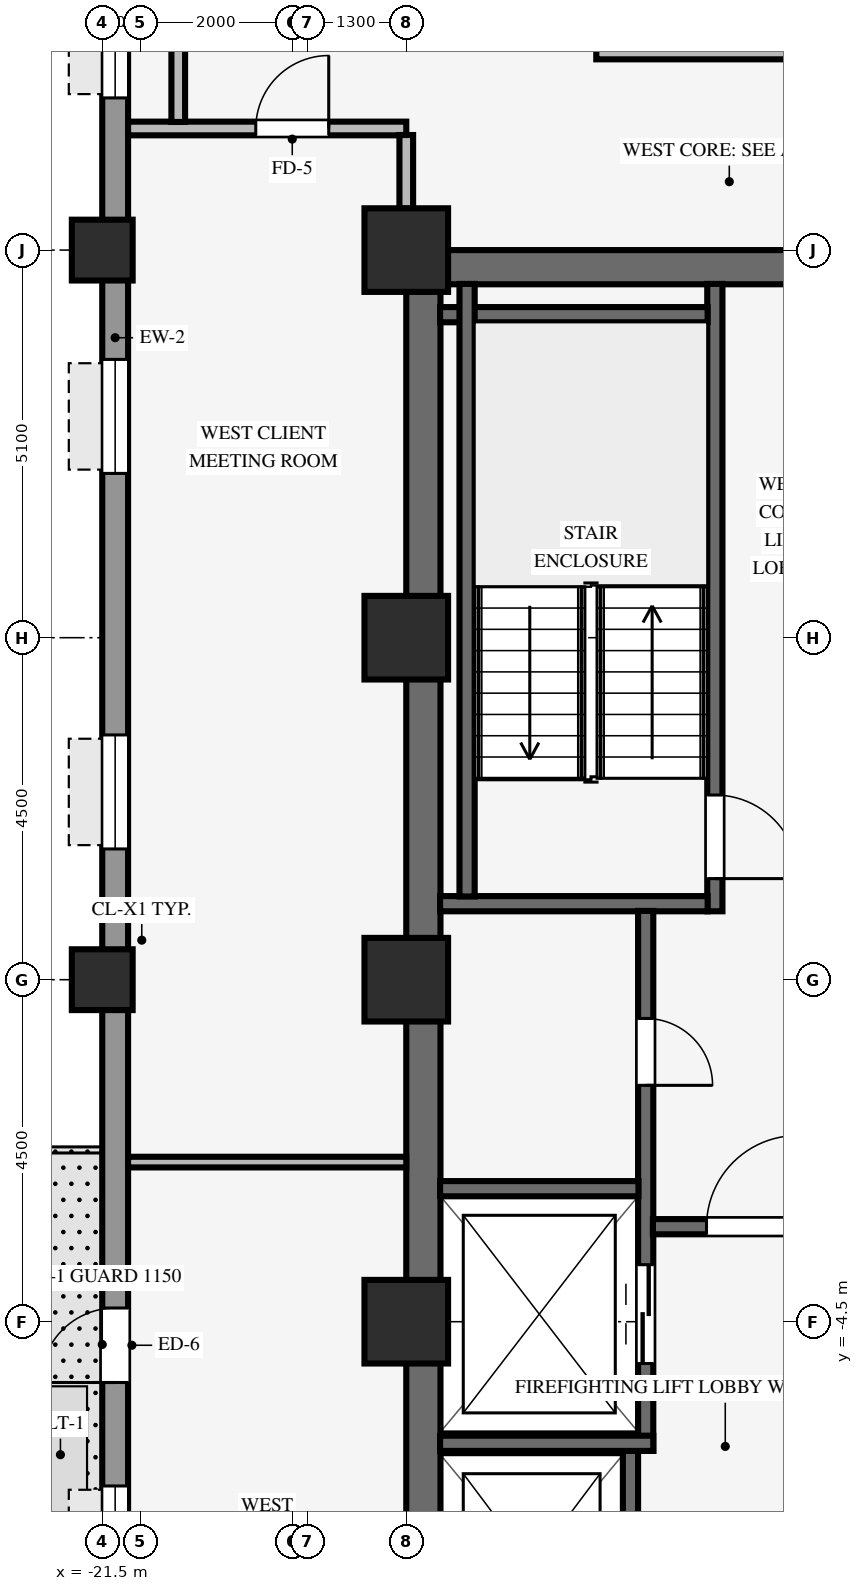
"""IFC4 building model, lengths in metres.
Left out: names, types, materials, properties, quantities, classifications, styles, units other than length and angle.
Written with IfcOpenShell. Run it as: python <this file> out.ifc"""

import sys

from ifc_helpers import new_model, si_unit, direction, frame, frame_2d, origin, origin_2d, place, context, subcontext, project, spatial, rectangle, hollow_rectangle, extrude, source, transform, mapped, element, fill, save


model = new_model("IFC4")
c1 = context("Model", 3, precision=1e-05, world=origin(), true_north=direction((0.0, 1.0)))
c2 = subcontext(c1, "Body", "Model", "MODEL_VIEW")
j1 = project(units=[si_unit("LENGTHUNIT", "METRE"), si_unit("PLANEANGLEUNIT", "RADIAN")], contexts=[c1])
p1 = place(None, origin())
s1 = spatial("IfcSite", under=j1, at=p1, CompositionType="ELEMENT")
p2 = place(p1, origin())
s2 = spatial("IfcBuilding", under=s1, at=p2, CompositionType="ELEMENT")
p3 = place(p2, frame((0.0, 0.0, 71.4)))
s3 = spatial("IfcBuildingStorey", under=s2, at=p3, CompositionType="ELEMENT", Elevation=71.4)
p4 = place(p3, frame((-17.5, 9.375, 0.0), z_axis=(0.0, 0.0, 1.0), x_axis=(1.0, 0.0, 0.0)))
e1 = element("IfcWall", 1, at=p4, inside=s3, PredefinedType="SHEAR", context=c2, shape_type="SweptSolid", body=[
    extrude(rectangle(XDim=8.5, YDim=0.45, at=frame_2d((4.25, 0.0))), origin(), (0.0, 0.0, 1.0), 3.37),
])
p5 = place(p3, frame((-17.275, -9.155, 0.0), z_axis=(0.0, 0.0, 1.0), x_axis=(0.0, 1.0, 0.0)))
e2 = element("IfcWall", 2, at=p5, inside=s3, PredefinedType="SHEAR", context=c2, shape_type="SweptSolid", body=[
    extrude(rectangle(XDim=18.31, YDim=0.45, at=frame_2d((9.155, 0.0))), origin(), (0.0, 0.0, 1.0), 3.37),
])
for number, where, z_axis, x_axis in (
    (3, (-17.5, -4.5, 0.0), (0.0, 0.0, 1.0), (1.0, 0.0, 0.0)),
    (4, (-17.5, 4.5, 0.0), (0.0, 0.0, 1.0), (1.0, 0.0, 0.0)),
    (5, (-17.5, 9.6, 0.0), (0.0, 0.0, 1.0), (1.0, 0.0, 0.0)),
    (6, (-17.5, 0.0, 0.0), (0.0, 0.0, 1.0), (1.0, 0.0, 0.0)),
):
    element("IfcColumn", number, at=place(p3, frame(where, z_axis=z_axis, x_axis=x_axis)), inside=s3, PredefinedType="COLUMN", context=c2, shape_type="SweptSolid", body=[
        extrude(rectangle(XDim=1.1, YDim=1.1, at=origin_2d()), origin(), (0.0, 0.0, 1.0), 3.37),
    ])
for number, where, z_axis, x_axis in (
    (7, (-21.5, 0.0, 0.0), (0.0, 0.0, 1.0), (1.0, 0.0, 0.0)),
    (8, (-21.5, 9.6, 0.0), (0.0, 0.0, 1.0), (1.0, 0.0, 0.0)),
):
    element("IfcColumn", number, at=place(p3, frame(where, z_axis=z_axis, x_axis=x_axis)), inside=s3, PredefinedType="COLUMN", context=c2, shape_type="SweptSolid", body=[
        extrude(hollow_rectangle(XDim=0.8, YDim=0.8, WallThickness=0.055, InnerFilletRadius=0.055, OuterFilletRadius=0.11, at=origin_2d()), origin(), (0.0, 0.0, 1.0), 3.37),
    ])
p6 = place(p3, frame((-21.33, -20.764, 0.0), z_axis=(0.0, 0.0, 1.0), x_axis=(0.0, 1.0, 0.0)))
e9 = element("IfcWall", 9, at=p6, inside=s3, PredefinedType="STANDARD", context=c2, shape_type="SweptSolid", body=[
    extrude(rectangle(XDim=41.528, YDim=0.34, at=frame_2d((20.764, 0.0))), origin(), (0.0, 0.0, 1.0), 2.705),
])
p7 = place(p6, frame((15.464, 0.0, 0.0)))
e10 = element("IfcOpeningElement", 10, at=p7, cuts=e9, PredefinedType="OPENING", context=c2, shape_type="SweptSolid", body=[
    extrude(rectangle(XDim=0.98, YDim=2.15, at=frame_2d((0.49, 1.075))), frame((0.0, 0.18, 0.0), z_axis=(0.0, -1.0, 0.0), x_axis=(1.0, 0.0, 0.0)), (0.0, 0.0, 1.0), 0.36),
])
p8 = place(p6, frame((1.371, 0.0, 0.8)))
e11 = element("IfcOpeningElement", 11, at=p8, cuts=e9, PredefinedType="OPENING", context=c2, shape_type="SweptSolid", body=[
    extrude(rectangle(XDim=1.5, YDim=1.6, at=frame_2d((0.75, 0.8))), frame((0.0, 0.18, 0.0), z_axis=(0.0, -1.0, 0.0), x_axis=(1.0, 0.0, 0.0)), (0.0, 0.0, 1.0), 0.36),
])
p9 = place(p6, frame((7.662, 0.0, 0.8)))
e12 = element("IfcOpeningElement", 12, at=p9, cuts=e9, PredefinedType="OPENING", context=c2, shape_type="SweptSolid", body=[
    extrude(rectangle(XDim=1.5, YDim=1.6, at=frame_2d((0.75, 0.8))), frame((0.0, 0.18, 0.0), z_axis=(0.0, -1.0, 0.0), x_axis=(1.0, 0.0, 0.0)), (0.0, 0.0, 1.0), 0.36),
])
p10 = place(p6, frame((12.603, 0.0, 0.8)))
e13 = element("IfcOpeningElement", 13, at=p10, cuts=e9, PredefinedType="OPENING", context=c2, shape_type="SweptSolid", body=[
    extrude(rectangle(XDim=1.5, YDim=1.6, at=frame_2d((0.75, 0.8))), frame((0.0, 0.18, 0.0), z_axis=(0.0, -1.0, 0.0), x_axis=(1.0, 0.0, 0.0)), (0.0, 0.0, 1.0), 0.36),
])
p11 = place(p6, frame((22.485, 0.0, 0.8)))
e14 = element("IfcOpeningElement", 14, at=p11, cuts=e9, PredefinedType="OPENING", context=c2, shape_type="SweptSolid", body=[
    extrude(rectangle(XDim=1.5, YDim=1.6, at=frame_2d((0.75, 0.8))), frame((0.0, 0.18, 0.0), z_axis=(0.0, -1.0, 0.0), x_axis=(1.0, 0.0, 0.0)), (0.0, 0.0, 1.0), 0.36),
])
p12 = place(p6, frame((27.426, 0.0, 0.8)))
e15 = element("IfcOpeningElement", 15, at=p12, cuts=e9, PredefinedType="OPENING", context=c2, shape_type="SweptSolid", body=[
    extrude(rectangle(XDim=1.5, YDim=1.6, at=frame_2d((0.75, 0.8))), frame((0.0, 0.18, 0.0), z_axis=(0.0, -1.0, 0.0), x_axis=(1.0, 0.0, 0.0)), (0.0, 0.0, 1.0), 0.36),
])
p13 = place(p6, frame((32.366, 0.0, 0.8)))
e16 = element("IfcOpeningElement", 16, at=p13, cuts=e9, PredefinedType="OPENING", context=c2, shape_type="SweptSolid", body=[
    extrude(rectangle(XDim=1.5, YDim=1.6, at=frame_2d((0.75, 0.8))), frame((0.0, 0.18, 0.0), z_axis=(0.0, -1.0, 0.0), x_axis=(1.0, 0.0, 0.0)), (0.0, 0.0, 1.0), 0.36),
])
p14 = place(p6, frame((38.657, 0.0, 0.8)))
e17 = element("IfcOpeningElement", 17, at=p14, cuts=e9, PredefinedType="OPENING", context=c2, shape_type="SweptSolid", body=[
    extrude(rectangle(XDim=1.5, YDim=1.6, at=frame_2d((0.75, 0.8))), frame((0.0, 0.18, 0.0), z_axis=(0.0, -1.0, 0.0), x_axis=(1.0, 0.0, 0.0)), (0.0, 0.0, 1.0), 0.36),
])
p15 = place(p3, frame((-13.44, 0.9, 0.0), z_axis=(0.0, 0.0, 1.0), x_axis=(0.0, 1.0, 0.0)))
e18 = element("IfcWall", 18, at=p15, inside=s3, PredefinedType="SHEAR", context=c2, shape_type="SweptSolid", body=[
    extrude(rectangle(XDim=8.255, YDim=0.2, at=frame_2d((4.127, 0.0))), origin(), (0.0, 0.0, 1.0), 3.37),
])
p16 = place(p15, frame((1.53, 0.0, 0.0), z_axis=(0.0, 0.0, 1.0), x_axis=(-1.0, 0.0, 0.0)))
e19 = element("IfcOpeningElement", 19, at=p16, cuts=e18, PredefinedType="OPENING", context=c2, shape_type="SweptSolid", body=[
    extrude(rectangle(XDim=1.1, YDim=2.15, at=frame_2d((0.55, 1.075))), frame((0.0, 0.11, 0.0), z_axis=(0.0, -1.0, 0.0), x_axis=(1.0, 0.0, 0.0)), (0.0, 0.0, 1.0), 0.22),
])
for number, where, z_axis, x_axis in (
    (20, (-17.055, 1.0, 0.0), (0.0, 0.0, 1.0), (1.0, 0.0, 0.0)),
    (21, (-17.055, 8.75, 0.0), (0.0, 0.0, 1.0), (1.0, 0.0, 0.0)),
):
    element("IfcWall", number, at=place(p3, frame(where, z_axis=z_axis, x_axis=x_axis)), inside=s3, PredefinedType="SHEAR", context=c2, shape_type="SweptSolid", body=[
        extrude(rectangle(XDim=3.52, YDim=0.2, at=frame_2d((1.76, 0.0))), origin(), (0.0, 0.0, 1.0), 3.37),
    ])
p17 = place(p3, frame((-16.7, 1.095, 0.0), z_axis=(0.0, 0.0, 1.0), x_axis=(0.0, 1.0, 0.0)))
e22 = element("IfcWall", 22, at=p17, inside=s3, PredefinedType="SHEAR", context=c2, shape_type="SweptSolid", body=[
    extrude(rectangle(XDim=8.06, YDim=0.2, at=frame_2d((4.03, 0.0))), origin(), (0.0, 0.0, 1.0), 3.37),
])
p18 = place(p3, frame((-14.55, -9.155, 0.0), z_axis=(0.0, 0.0, 1.0), x_axis=(0.0, 1.0, 0.0)))
e23 = element("IfcWall", 23, at=p18, inside=s3, PredefinedType="SHEAR", context=c2, shape_type="SweptSolid", body=[
    extrude(rectangle(XDim=2.96, YDim=0.2, at=frame_2d((1.48, 0.0))), origin(), (0.0, 0.0, 1.0), 3.37),
])
p19 = place(p18, frame((0.88, 0.0, 0.0)))
e24 = element("IfcOpeningElement", 24, at=p19, cuts=e23, PredefinedType="OPENING", context=c2, shape_type="SweptSolid", body=[
    extrude(rectangle(XDim=1.15, YDim=2.15, at=frame_2d((0.575, 1.075))), frame((0.0, 0.11, 0.0), z_axis=(0.0, -1.0, 0.0), x_axis=(1.0, 0.0, 0.0)), (0.0, 0.0, 1.0), 0.22),
])
p20 = place(p3, frame((-14.35, -6.2, 0.0), z_axis=(0.0, 0.0, 1.0), x_axis=(0.0, 1.0, 0.0)))
e25 = element("IfcWall", 25, at=p20, inside=s3, PredefinedType="SHEAR", context=c2, shape_type="SweptSolid", body=[
    extrude(rectangle(XDim=7.105, YDim=0.2, at=frame_2d((3.552, 0.0))), origin(), (0.0, 0.0, 1.0), 3.37),
])
p21 = place(p20, frame((5.69, 0.0, 0.0), z_axis=(0.0, 0.0, 1.0), x_axis=(-1.0, 0.0, 0.0)))
e26 = element("IfcOpeningElement", 26, at=p21, cuts=e25, PredefinedType="OPENING", context=c2, shape_type="SweptSolid", body=[
    extrude(rectangle(XDim=0.88, YDim=2.1, at=frame_2d((0.44, 1.05))), frame((0.0, 0.11, 0.0), z_axis=(0.0, -1.0, 0.0), x_axis=(1.0, 0.0, 0.0)), (0.0, 0.0, 1.0), 0.22),
])
p22 = place(p20, frame((1.15, 0.0, 0.0)))
e27 = element("IfcOpeningElement", 27, at=p22, cuts=e25, PredefinedType="OPENING", context=c2, shape_type="SweptSolid", body=[
    extrude(rectangle(XDim=1.3, YDim=2.2, at=frame_2d((0.65, 1.1))), frame((0.0, 0.11, 0.0), z_axis=(0.0, -1.0, 0.0), x_axis=(1.0, 0.0, 0.0)), (0.0, 0.0, 1.0), 0.22),
])
p23 = place(p3, frame((-17.055, -6.1, 0.0), z_axis=(0.0, 0.0, 1.0), x_axis=(1.0, 0.0, 0.0)))
e28 = element("IfcWall", 28, at=p23, inside=s3, PredefinedType="SHEAR", context=c2, shape_type="SweptSolid", body=[
    extrude(rectangle(XDim=2.805, YDim=0.2, at=frame_2d((1.402, 0.0))), origin(), (0.0, 0.0, 1.0), 3.37),
])
p24 = place(p3, frame((-17.055, -2.75, 0.0), z_axis=(0.0, 0.0, 1.0), x_axis=(1.0, 0.0, 0.0)))
e29 = element("IfcWall", 29, at=p24, inside=s3, PredefinedType="SHEAR", context=c2, shape_type="SweptSolid", body=[
    extrude(rectangle(XDim=2.61, YDim=0.2, at=frame_2d((1.305, 0.0))), origin(), (0.0, 0.0, 1.0), 3.37),
])
p25 = place(p3, frame((-14.255, -3.25, 0.0), z_axis=(0.0, 0.0, 1.0), x_axis=(1.0, 0.0, 0.0)))
e30 = element("IfcWall", 30, at=p25, inside=s3, PredefinedType="SHEAR", context=c2, shape_type="SweptSolid", body=[
    extrude(rectangle(XDim=2.56, YDim=0.2, at=frame_2d((1.28, 0.0))), origin(), (0.0, 0.0, 1.0), 3.37),
])
p26 = place(p25, frame((0.705, 0.0, 0.0)))
e31 = element("IfcOpeningElement", 31, at=p26, cuts=e30, PredefinedType="OPENING", context=c2, shape_type="SweptSolid", body=[
    extrude(rectangle(XDim=1.2, YDim=2.15, at=frame_2d((0.6, 1.075))), frame((0.0, 0.11, 0.0), z_axis=(0.0, -1.0, 0.0), x_axis=(1.0, 0.0, 0.0)), (0.0, 0.0, 1.0), 0.22),
])
p27 = place(p3, frame((-21.16, -2.4, 0.0), z_axis=(0.0, 0.0, 1.0), x_axis=(1.0, 0.0, 0.0)))
e32 = element("IfcWall", 32, at=p27, inside=s3, PredefinedType="PARTITIONING", context=c2, shape_type="SweptSolid", body=[
    extrude(rectangle(XDim=3.66, YDim=0.14, at=frame_2d((1.83, 0.0))), origin(), (0.0, 0.0, 1.0), 3.36),
])
p28 = place(p3, frame((-21.16, 11.2, 0.0), z_axis=(0.0, 0.0, 1.0), x_axis=(1.0, 0.0, 0.0)))
e33 = element("IfcWall", 33, at=p28, inside=s3, PredefinedType="PARTITIONING", context=c2, shape_type="SweptSolid", body=[
    extrude(rectangle(XDim=3.66, YDim=0.18, at=frame_2d((1.83, 0.0))), origin(), (0.0, 0.0, 1.0), 3.36),
])
p29 = place(p28, frame((1.68, 0.0, 0.0)))
e34 = element("IfcOpeningElement", 34, at=p29, cuts=e33, PredefinedType="OPENING", context=c2, shape_type="SweptSolid", body=[
    extrude(rectangle(XDim=0.96, YDim=2.1, at=frame_2d((0.48, 1.05))), frame((0.0, 0.1, 0.0), z_axis=(0.0, -1.0, 0.0), x_axis=(1.0, 0.0, 0.0)), (0.0, 0.0, 1.0), 0.2),
])
p30 = place(p3, frame((-15.0, 12.2, 0.0), z_axis=(0.0, 0.0, 1.0), x_axis=(1.0, 0.0, 0.0)))
e35 = element("IfcWall", 35, at=p30, inside=s3, PredefinedType="PARTITIONING", context=c2, shape_type="SweptSolid", body=[
    extrude(rectangle(XDim=30.0, YDim=0.18, at=frame_2d((15.0, 0.0))), origin(), (0.0, 0.0, 1.0), 3.36),
])
p31 = place(p30, frame((22.085, 0.0, 0.0)))
e36 = element("IfcOpeningElement", 36, at=p31, cuts=e35, PredefinedType="OPENING", context=c2, shape_type="SweptSolid", body=[
    extrude(rectangle(XDim=0.96, YDim=2.1, at=frame_2d((0.48, 1.05))), frame((0.0, 0.1, 0.0), z_axis=(0.0, -1.0, 0.0), x_axis=(1.0, 0.0, 0.0)), (0.0, 0.0, 1.0), 0.2),
])
p32 = place(p30, frame((16.175, 0.0, 0.0)))
e37 = element("IfcOpeningElement", 37, at=p32, cuts=e35, PredefinedType="OPENING", context=c2, shape_type="SweptSolid", body=[
    extrude(rectangle(XDim=0.96, YDim=2.1, at=frame_2d((0.48, 1.05))), frame((0.0, 0.1, 0.0), z_axis=(0.0, -1.0, 0.0), x_axis=(1.0, 0.0, 0.0)), (0.0, 0.0, 1.0), 0.2),
])
p33 = place(p30, frame((5.45, 0.0, 0.0)))
e38 = element("IfcOpeningElement", 38, at=p33, cuts=e35, PredefinedType="OPENING", context=c2, shape_type="SweptSolid", body=[
    extrude(rectangle(XDim=0.9, YDim=2.1, at=frame_2d((0.45, 1.05))), frame((0.0, 0.1, 0.0), z_axis=(0.0, -1.0, 0.0), x_axis=(1.0, 0.0, 0.0)), (0.0, 0.0, 1.0), 0.2),
])
p34 = place(p30, frame((2.85, 0.0, 0.0)))
e39 = element("IfcOpeningElement", 39, at=p34, cuts=e35, PredefinedType="OPENING", context=c2, shape_type="SweptSolid", body=[
    extrude(rectangle(XDim=0.9, YDim=2.1, at=frame_2d((0.45, 1.05))), frame((0.0, 0.1, 0.0), z_axis=(0.0, -1.0, 0.0), x_axis=(1.0, 0.0, 0.0)), (0.0, 0.0, 1.0), 0.2),
])
p35 = place(p30, frame((12.52, 0.0, 0.0)))
e40 = element("IfcOpeningElement", 40, at=p35, cuts=e35, PredefinedType="OPENING", context=c2, shape_type="SweptSolid", body=[
    extrude(rectangle(XDim=0.96, YDim=2.1, at=frame_2d((0.48, 1.05))), frame((0.0, 0.1, 0.0), z_axis=(0.0, -1.0, 0.0), x_axis=(1.0, 0.0, 0.0)), (0.0, 0.0, 1.0), 0.2),
])
p36 = place(p30, frame((7.95, 0.0, 0.0)))
e41 = element("IfcOpeningElement", 41, at=p36, cuts=e35, PredefinedType="OPENING", context=c2, shape_type="SweptSolid", body=[
    extrude(rectangle(XDim=0.9, YDim=2.1, at=frame_2d((0.45, 1.05))), frame((0.0, 0.1, 0.0), z_axis=(0.0, -1.0, 0.0), x_axis=(1.0, 0.0, 0.0)), (0.0, 0.0, 1.0), 0.2),
])
p37 = place(p3, frame((-20.5, 11.286, 0.0), z_axis=(0.0, 0.0, 1.0), x_axis=(0.0, 1.0, 0.0)))
e42 = element("IfcWall", 42, at=p37, inside=s3, PredefinedType="PARTITIONING", context=c2, shape_type="SweptSolid", body=[
    extrude(rectangle(XDim=2.228, YDim=0.18, at=frame_2d((1.114, 0.0))), origin(), (0.0, 0.0, 1.0), 3.36),
])
p38 = place(p3, frame((-17.5, 10.146, 0.0), z_axis=(0.0, 0.0, 1.0), x_axis=(0.0, 1.0, 0.0)))
e43 = element("IfcWall", 43, at=p38, inside=s3, PredefinedType="PARTITIONING", context=c2, shape_type="SweptSolid", body=[
    extrude(rectangle(XDim=0.968, YDim=0.18, at=frame_2d((0.484, 0.0))), origin(), (0.0, 0.0, 1.0), 2.738),
])
m1 = source(origin(), c2, "Body", "SweptSolid", [
    extrude(rectangle(XDim=0.98, YDim=2.15, at=frame_2d((0.49, 1.075))), frame((0.0, 0.025, 0.0), z_axis=(0.0, -1.0, 0.0), x_axis=(1.0, 0.0, 0.0)), (0.0, 0.0, 1.0), 0.05),
])
p39 = place(p7, origin())
e44 = element("IfcDoor", 44, at=p39, inside=s3, OperationType="SINGLE_SWING_LEFT", PredefinedType="DOOR", context=c2, shape_type="MappedRepresentation", body=[
    mapped(m1, transform((0.0, 0.0, 0.0), scale=1.0)),
])
fill(e10, e44)
m2 = source(origin(), c2, "Body", "SweptSolid", [
    extrude(rectangle(XDim=1.5, YDim=1.6, at=frame_2d((0.75, 0.8))), frame((0.0, 0.03, 0.0), z_axis=(0.0, -1.0, 0.0), x_axis=(1.0, 0.0, 0.0)), (0.0, 0.0, 1.0), 0.06),
])
p40 = place(p10, origin())
e45 = element("IfcWindow", 45, at=p40, inside=s3, PartitioningType="SINGLE_PANEL", PredefinedType="WINDOW", context=c2, shape_type="MappedRepresentation", body=[
    mapped(m2, transform((0.0, 0.0, 0.0), scale=1.0)),
])
fill(e13, e45)
p41 = place(p11, origin())
e46 = element("IfcWindow", 46, at=p41, inside=s3, PartitioningType="SINGLE_PANEL", PredefinedType="WINDOW", context=c2, shape_type="MappedRepresentation", body=[
    mapped(m2, transform((0.0, 0.0, 0.0), scale=1.0)),
])
fill(e14, e46)
p42 = place(p12, origin())
e47 = element("IfcWindow", 47, at=p42, inside=s3, PartitioningType="SINGLE_PANEL", PredefinedType="WINDOW", context=c2, shape_type="MappedRepresentation", body=[
    mapped(m2, transform((0.0, 0.0, 0.0), scale=1.0)),
])
fill(e15, e47)
p43 = place(p13, origin())
e48 = element("IfcWindow", 48, at=p43, inside=s3, PartitioningType="SINGLE_PANEL", PredefinedType="WINDOW", context=c2, shape_type="MappedRepresentation", body=[
    mapped(m2, transform((0.0, 0.0, 0.0), scale=1.0)),
])
fill(e16, e48)
m3 = source(origin(), c2, "Body", "SweptSolid", [
    extrude(rectangle(XDim=1.1, YDim=2.15, at=frame_2d((0.55, 1.075))), frame((0.0, 0.025, 0.0), z_axis=(0.0, -1.0, 0.0), x_axis=(1.0, 0.0, 0.0)), (0.0, 0.0, 1.0), 0.05),
])
p44 = place(p16, origin())
e49 = element("IfcDoor", 49, at=p44, inside=s3, OperationType="SINGLE_SWING_RIGHT", PredefinedType="DOOR", context=c2, shape_type="MappedRepresentation", body=[
    mapped(m3, transform((0.0, 0.0, 0.0), scale=1.0)),
])
fill(e19, e49)
m4 = source(origin(), c2, "Body", "SweptSolid", [
    extrude(rectangle(XDim=0.88, YDim=2.1, at=frame_2d((0.44, 1.05))), frame((0.0, 0.025, 0.0), z_axis=(0.0, -1.0, 0.0), x_axis=(1.0, 0.0, 0.0)), (0.0, 0.0, 1.0), 0.05),
])
p45 = place(p21, origin())
e50 = element("IfcDoor", 50, at=p45, inside=s3, OperationType="SINGLE_SWING_RIGHT", PredefinedType="DOOR", context=c2, shape_type="MappedRepresentation", body=[
    mapped(m4, transform((0.0, 0.0, 0.0), scale=1.0)),
])
fill(e26, e50)
m5 = source(origin(), c2, "Body", "SweptSolid", [
    extrude(rectangle(XDim=1.2, YDim=2.15, at=frame_2d((0.6, 1.075))), frame((0.0, 0.025, 0.0), z_axis=(0.0, -1.0, 0.0), x_axis=(1.0, 0.0, 0.0)), (0.0, 0.0, 1.0), 0.05),
])
p46 = place(p26, origin())
e51 = element("IfcDoor", 51, at=p46, inside=s3, OperationType="SINGLE_SWING_RIGHT", PredefinedType="DOOR", context=c2, shape_type="MappedRepresentation", body=[
    mapped(m5, transform((0.0, 0.0, 0.0), scale=1.0)),
])
fill(e31, e51)
m6 = source(origin(), c2, "Body", "SweptSolid", [
    extrude(rectangle(XDim=1.3, YDim=2.2, at=frame_2d((0.65, 1.1))), frame((0.0, 0.025, 0.0), z_axis=(0.0, -1.0, 0.0), x_axis=(1.0, 0.0, 0.0)), (0.0, 0.0, 1.0), 0.05),
])
p47 = place(p22, origin())
e52 = element("IfcDoor", 52, at=p47, inside=s3, OperationType="DOUBLE_DOOR_SLIDING", PredefinedType="DOOR", context=c2, shape_type="MappedRepresentation", body=[
    mapped(m6, transform((0.0, 0.0, 0.0), scale=1.0)),
])
fill(e27, e52)
m7 = source(origin(), c2, "Body", "SweptSolid", [
    extrude(rectangle(XDim=0.96, YDim=2.1, at=frame_2d((0.48, 1.05))), frame((0.0, 0.025, 0.0), z_axis=(0.0, -1.0, 0.0), x_axis=(1.0, 0.0, 0.0)), (0.0, 0.0, 1.0), 0.05),
])
p48 = place(p29, origin())
e53 = element("IfcDoor", 53, at=p48, inside=s3, OperationType="SINGLE_SWING_RIGHT", PredefinedType="DOOR", context=c2, shape_type="MappedRepresentation", body=[
    mapped(m7, transform((0.0, 0.0, 0.0), scale=1.0)),
])
fill(e34, e53)
save(model, sys.argv[1])
